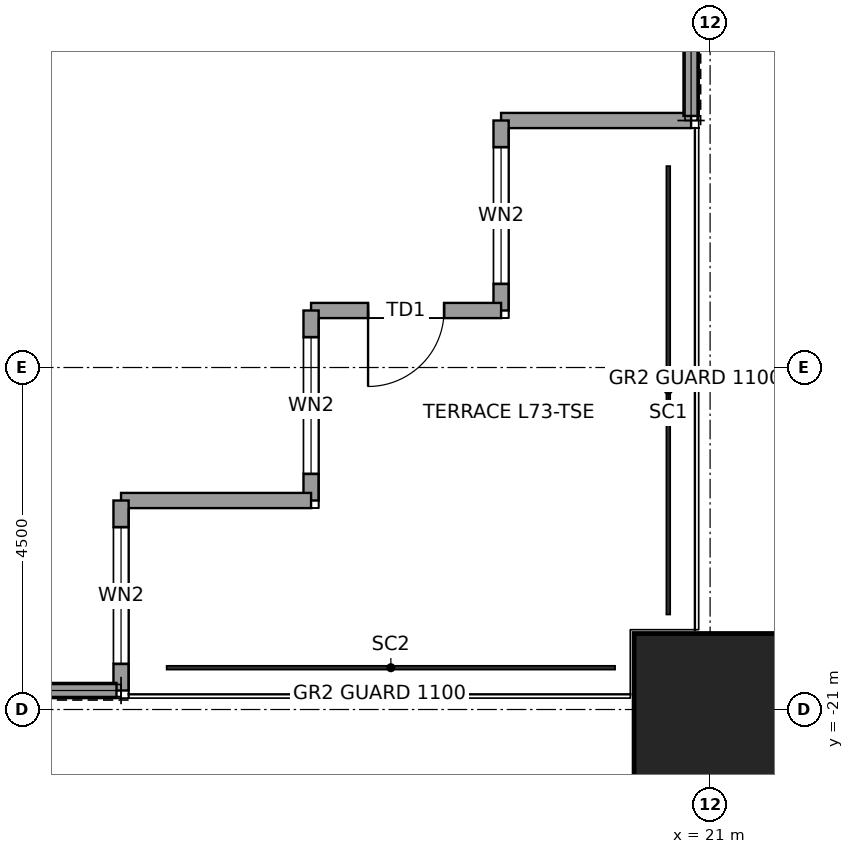
"""IFC4 building model, lengths in metres.
Left out: names, types, materials, properties, quantities, classifications, styles, units other than length and angle.
Written with IfcOpenShell. Run it as: python <this file> out.ifc"""

import sys

from ifc_helpers import new_model, si_unit, direction, frame, frame_2d, origin, origin_2d, place, context, subcontext, project, spatial, rectangle, hollow_rectangle, extrude, element, fill, save


model = new_model("IFC4")
c1 = context("Model", 3, precision=1e-05, world=origin(), true_north=direction((0.0, 1.0)))
c2 = subcontext(c1, "Body", "Model", "MODEL_VIEW")
j1 = project(units=[si_unit("LENGTHUNIT", "METRE"), si_unit("PLANEANGLEUNIT", "RADIAN")], contexts=[c1])
p1 = place(None, origin())
s1 = spatial("IfcSite", under=j1, at=p1, CompositionType="ELEMENT")
p2 = place(p1, origin())
s2 = spatial("IfcBuilding", under=s1, at=p2, CompositionType="ELEMENT")
p3 = place(p2, frame((0.0, 0.0, 327.9)))
s3 = spatial("IfcBuildingStorey", under=s2, at=p3, CompositionType="ELEMENT", Elevation=327.9)
p4 = place(p3, frame((21.0, -21.0, 0.0), z_axis=(0.0, 0.0, 1.0), x_axis=(1.0, 0.0, 0.0)))
e1 = element("IfcColumn", 1, at=p4, inside=s3, PredefinedType="COLUMN", context=c2, shape_type="SweptSolid", body=[
    extrude(hollow_rectangle(XDim=2.0, YDim=2.0, WallThickness=0.095, at=origin_2d()), origin(), (0.0, 0.0, 1.0), 4.0),
])
p5 = place(p3, frame((20.75, -13.25, 0.0), z_axis=(0.0, 0.0, 1.0), x_axis=(-1.0, 0.0, 0.0)))
e2 = element("IfcWall", 2, at=p5, inside=s3, PredefinedType="SOLIDWALL", context=c2, shape_type="SweptSolid", body=[
    extrude(rectangle(XDim=2.5, YDim=0.2, at=frame_2d((1.25, 0.0))), origin(), (0.0, 0.0, 1.0), 3.85),
])
p6 = place(p3, frame((18.25, -13.25, 0.0), z_axis=(0.0, 0.0, 1.0), x_axis=(0.0, -1.0, 0.0)))
e3 = element("IfcWall", 3, at=p6, inside=s3, PredefinedType="SOLIDWALL", context=c2, shape_type="SweptSolid", body=[
    extrude(rectangle(XDim=2.5, YDim=0.2, at=frame_2d((1.25, 0.0))), origin(), (0.0, 0.0, 1.0), 3.85),
])
p7 = place(p6, frame((0.35, 0.0, 0.3)))
e4 = element("IfcOpeningElement", 4, at=p7, cuts=e3, PredefinedType="OPENING", context=c2, shape_type="SweptSolid", body=[
    extrude(rectangle(XDim=1.8, YDim=2.4, at=frame_2d((0.9, 1.2))), frame((0.0, 0.11, 0.0), z_axis=(0.0, -1.0, 0.0), x_axis=(1.0, 0.0, 0.0)), (0.0, 0.0, 1.0), 0.22),
])
p8 = place(p3, frame((18.25, -15.75, 0.0), z_axis=(0.0, 0.0, 1.0), x_axis=(-1.0, 0.0, 0.0)))
e5 = element("IfcWall", 5, at=p8, inside=s3, PredefinedType="SOLIDWALL", context=c2, shape_type="SweptSolid", body=[
    extrude(rectangle(XDim=2.5, YDim=0.2, at=frame_2d((1.25, 0.0))), origin(), (0.0, 0.0, 1.0), 3.317),
])
p9 = place(p8, frame((0.75, 0.0, 0.0)))
e6 = element("IfcOpeningElement", 6, at=p9, cuts=e5, PredefinedType="OPENING", context=c2, shape_type="SweptSolid", body=[
    extrude(rectangle(XDim=1.0, YDim=2.4, at=frame_2d((0.5, 1.2))), frame((0.0, 0.11, 0.0), z_axis=(0.0, -1.0, 0.0), x_axis=(1.0, 0.0, 0.0)), (0.0, 0.0, 1.0), 0.22),
])
p10 = place(p3, frame((15.75, -15.75, 0.0), z_axis=(0.0, 0.0, 1.0), x_axis=(0.0, -1.0, 0.0)))
e7 = element("IfcWall", 7, at=p10, inside=s3, PredefinedType="SOLIDWALL", context=c2, shape_type="SweptSolid", body=[
    extrude(rectangle(XDim=2.5, YDim=0.2, at=frame_2d((1.25, 0.0))), origin(), (0.0, 0.0, 1.0), 3.85),
])
p11 = place(p10, frame((0.35, 0.0, 0.3)))
e8 = element("IfcOpeningElement", 8, at=p11, cuts=e7, PredefinedType="OPENING", context=c2, shape_type="SweptSolid", body=[
    extrude(rectangle(XDim=1.8, YDim=2.4, at=frame_2d((0.9, 1.2))), frame((0.0, 0.11, 0.0), z_axis=(0.0, -1.0, 0.0), x_axis=(1.0, 0.0, 0.0)), (0.0, 0.0, 1.0), 0.22),
])
p12 = place(p3, frame((15.75, -18.25, 0.0), z_axis=(0.0, 0.0, 1.0), x_axis=(-1.0, 0.0, 0.0)))
e9 = element("IfcWall", 9, at=p12, inside=s3, PredefinedType="SOLIDWALL", context=c2, shape_type="SweptSolid", body=[
    extrude(rectangle(XDim=2.5, YDim=0.2, at=frame_2d((1.25, 0.0))), origin(), (0.0, 0.0, 1.0), 3.85),
])
p13 = place(p3, frame((13.25, -18.25, 0.0), z_axis=(0.0, 0.0, 1.0), x_axis=(0.0, -1.0, 0.0)))
e10 = element("IfcWall", 10, at=p13, inside=s3, PredefinedType="SOLIDWALL", context=c2, shape_type="SweptSolid", body=[
    extrude(rectangle(XDim=2.5, YDim=0.2, at=frame_2d((1.25, 0.0))), origin(), (0.0, 0.0, 1.0), 3.85),
])
p14 = place(p13, frame((0.35, 0.0, 0.3)))
e11 = element("IfcOpeningElement", 11, at=p14, cuts=e10, PredefinedType="OPENING", context=c2, shape_type="SweptSolid", body=[
    extrude(rectangle(XDim=1.8, YDim=2.4, at=frame_2d((0.9, 1.2))), frame((0.0, 0.11, 0.0), z_axis=(0.0, -1.0, 0.0), x_axis=(1.0, 0.0, 0.0)), (0.0, 0.0, 1.0), 0.22),
])
for number, where, z_axis, x_axis in (
    (12, (20.75, -10.435, 0.0), (0.0, 0.0, 1.0), (0.0, -1.0, 0.0)),
    (13, (13.19, -20.75, 0.0), (0.0, 0.0, 1.0), (-1.0, 0.0, 0.0)),
):
    element("IfcWall", number, at=place(p3, frame(where, z_axis=z_axis, x_axis=x_axis)), inside=s3, PredefinedType="SOLIDWALL", context=c2, shape_type="SweptSolid", body=[
        extrude(rectangle(XDim=2.755, YDim=0.2, at=frame_2d((1.377, 0.0))), origin(), (0.0, 0.0, 1.0), 3.85),
    ])
p15 = place(p7, origin())
e14 = element("IfcWindow", 14, at=p15, inside=s3, PartitioningType="SINGLE_PANEL", PredefinedType="WINDOW", context=c2, shape_type="SweptSolid", body=[
    extrude(rectangle(XDim=1.8, YDim=2.4, at=frame_2d((0.9, 1.2))), frame((0.0, 0.03, 0.0), z_axis=(0.0, -1.0, 0.0), x_axis=(1.0, 0.0, 0.0)), (0.0, 0.0, 1.0), 0.06),
])
fill(e4, e14)
p16 = place(p9, origin())
e15 = element("IfcDoor", 15, at=p16, inside=s3, OperationType="SINGLE_SWING_RIGHT", PredefinedType="DOOR", context=c2, shape_type="SweptSolid", body=[
    extrude(rectangle(XDim=1.0, YDim=2.4, at=frame_2d((0.5, 1.2))), frame((0.0, 0.025, 0.0), z_axis=(0.0, -1.0, 0.0), x_axis=(1.0, 0.0, 0.0)), (0.0, 0.0, 1.0), 0.05),
])
fill(e6, e15)
p17 = place(p11, origin())
e16 = element("IfcWindow", 16, at=p17, inside=s3, PartitioningType="SINGLE_PANEL", PredefinedType="WINDOW", context=c2, shape_type="SweptSolid", body=[
    extrude(rectangle(XDim=1.8, YDim=2.4, at=frame_2d((0.9, 1.2))), frame((0.0, 0.03, 0.0), z_axis=(0.0, -1.0, 0.0), x_axis=(1.0, 0.0, 0.0)), (0.0, 0.0, 1.0), 0.06),
])
fill(e8, e16)
p18 = place(p14, origin())
e17 = element("IfcWindow", 17, at=p18, inside=s3, PartitioningType="SINGLE_PANEL", PredefinedType="WINDOW", context=c2, shape_type="SweptSolid", body=[
    extrude(rectangle(XDim=1.8, YDim=2.4, at=frame_2d((0.9, 1.2))), frame((0.0, 0.03, 0.0), z_axis=(0.0, -1.0, 0.0), x_axis=(1.0, 0.0, 0.0)), (0.0, 0.0, 1.0), 0.06),
])
fill(e11, e17)
save(model, sys.argv[1])
